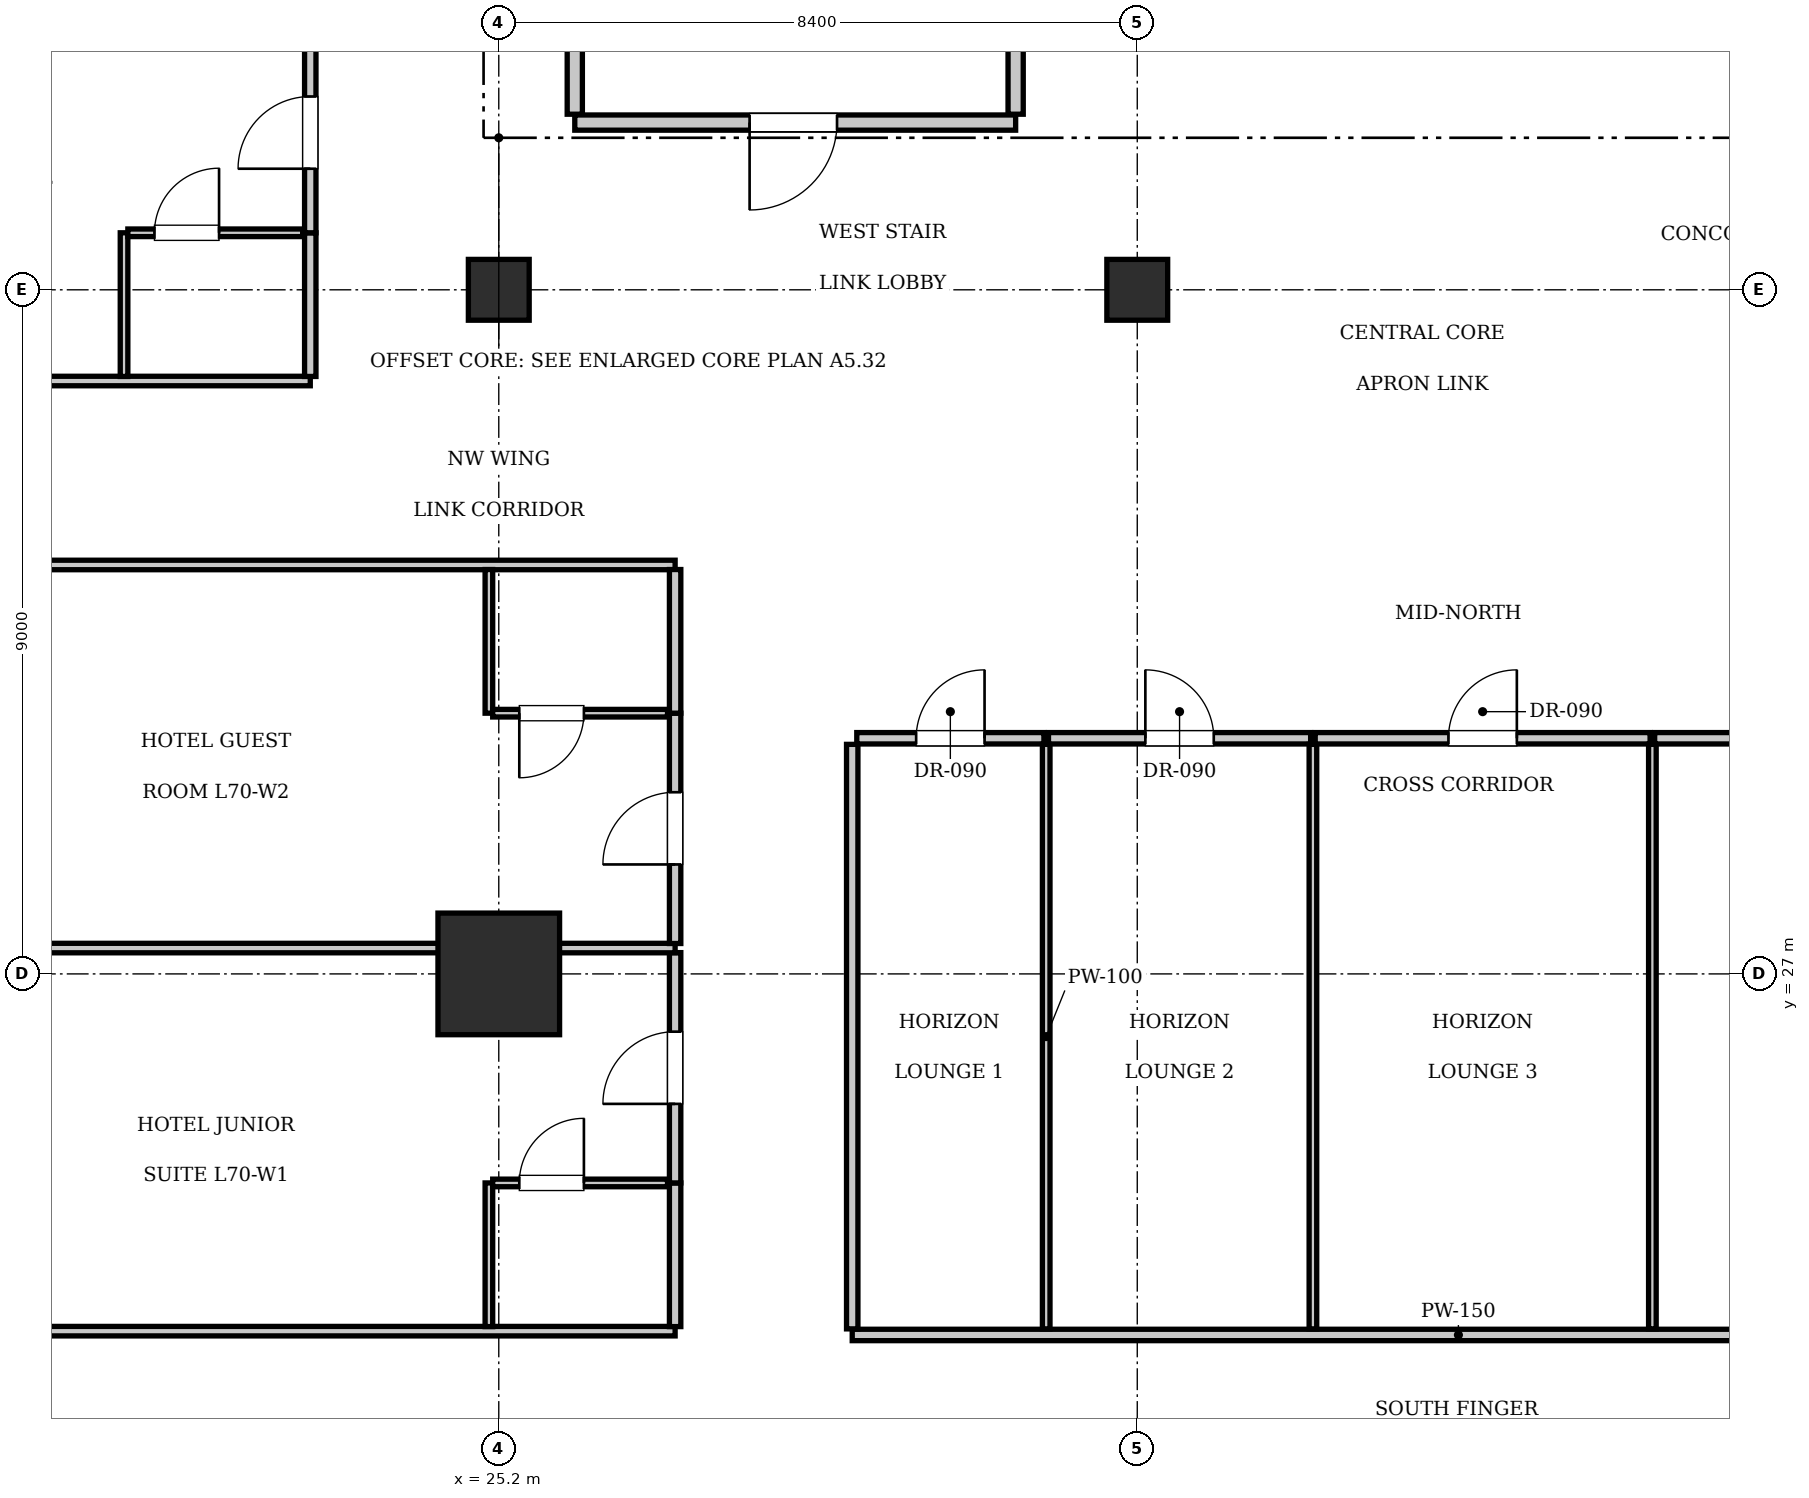
"""IFC4 building model, lengths in metres.
Left out: names, types, materials, properties, quantities, classifications, styles, units other than length and angle.
Written with IfcOpenShell. Run it as: python <this file> out.ifc"""

import sys

from ifc_helpers import new_model, si_unit, direction, frame, frame_2d, origin, origin_2d, place, context, subcontext, project, spatial, rectangle, extrude, element, fill, save


model = new_model("IFC4")
c1 = context("Model", 3, precision=1e-05, world=origin(), true_north=direction((0.0, 1.0)))
c2 = subcontext(c1, "Body", "Model", "MODEL_VIEW")
j1 = project(units=[si_unit("LENGTHUNIT", "METRE"), si_unit("PLANEANGLEUNIT", "RADIAN")], contexts=[c1])
p1 = place(None, origin())
s1 = spatial("IfcSite", under=j1, at=p1, CompositionType="ELEMENT")
p2 = place(p1, origin())
s2 = spatial("IfcBuilding", under=s1, at=p2, CompositionType="ELEMENT")
p3 = place(p2, frame((0.0, 0.0, 285.6)))
s3 = spatial("IfcBuildingStorey", under=s2, at=p3, CompositionType="ELEMENT", Elevation=285.6)
p4 = place(p3, frame((25.2, 27.0, 0.0), z_axis=(0.0, 0.0, 1.0), x_axis=(1.0, 0.0, 0.0)))
e1 = element("IfcColumn", 1, at=p4, inside=s3, PredefinedType="COLUMN", context=c2, shape_type="SweptSolid", body=[
    extrude(rectangle(XDim=1.6, YDim=1.6, at=origin_2d()), origin(), (0.0, 0.0, 1.0), 3.85),
])
for number, where, z_axis, x_axis in (
    (2, (25.2, 36.0, 0.0), (0.0, 0.0, 1.0), (1.0, 0.0, 0.0)),
    (3, (33.6, 36.0, 0.0), (0.0, 0.0, 1.0), (1.0, 0.0, 0.0)),
):
    element("IfcColumn", number, at=place(p3, frame(where, z_axis=z_axis, x_axis=x_axis)), inside=s3, PredefinedType="COLUMN", context=c2, shape_type="SweptSolid", body=[
        extrude(rectangle(XDim=0.8, YDim=0.8, at=origin_2d()), origin(), (0.0, 0.0, 1.0), 3.85),
    ])
p5 = place(p3, frame((26.2, 38.2, 0.0), z_axis=(0.0, 0.0, 1.0), x_axis=(1.0, 0.0, 0.0)))
e4 = element("IfcWall", 4, at=p5, inside=s3, PredefinedType="PARTITIONING", context=c2, shape_type="SweptSolid", body=[
    extrude(rectangle(XDim=5.8, YDim=0.2, at=frame_2d((2.9, 0.0))), origin(), (0.0, 0.0, 1.0), 3.61),
])
p6 = place(p5, frame((2.3, 0.0, 0.0)))
e5 = element("IfcOpeningElement", 5, at=p6, cuts=e4, PredefinedType="OPENING", context=c2, shape_type="SweptSolid", body=[
    extrude(rectangle(XDim=1.15, YDim=2.15, at=frame_2d((0.575, 1.075))), frame((0.0, 0.11, 0.0), z_axis=(0.0, -1.0, 0.0), x_axis=(1.0, 0.0, 0.0)), (0.0, 0.0, 1.0), 0.22),
])
for number, where, z_axis, x_axis in (
    (6, (26.2, 38.31, 0.0), (0.0, 0.0, 1.0), (0.0, 1.0, 0.0)),
    (7, (32.0, 38.31, 0.0), (0.0, 0.0, 1.0), (0.0, 1.0, 0.0)),
):
    element("IfcWall", number, at=place(p3, frame(where, z_axis=z_axis, x_axis=x_axis)), inside=s3, PredefinedType="PARTITIONING", context=c2, shape_type="SweptSolid", body=[
        extrude(rectangle(XDim=3.07, YDim=0.2, at=frame_2d((1.535, 0.0))), origin(), (0.0, 0.0, 1.0), 3.61),
    ])
p7 = place(p3, frame((29.85, 22.25, 0.0), z_axis=(0.0, 0.0, 1.0), x_axis=(1.0, 0.0, 0.0)))
e8 = element("IfcWall", 8, at=p7, inside=s3, PredefinedType="PARTITIONING", context=c2, shape_type="SweptSolid", body=[
    extrude(rectangle(XDim=15.95, YDim=0.15, at=frame_2d((7.975, 0.0))), origin(), (0.0, 0.0, 1.0), 3.61),
])
p8 = place(p3, frame((29.85, 22.33, 0.0), z_axis=(0.0, 0.0, 1.0), x_axis=(0.0, 1.0, 0.0)))
e9 = element("IfcWall", 9, at=p8, inside=s3, PredefinedType="PARTITIONING", context=c2, shape_type="SweptSolid", body=[
    extrude(rectangle(XDim=7.69, YDim=0.15, at=frame_2d((3.845, 0.0))), origin(), (0.0, 0.0, 1.0), 3.61),
])
p9 = place(p3, frame((29.91, 30.1, 0.0), z_axis=(0.0, 0.0, 1.0), x_axis=(1.0, 0.0, 0.0)))
e10 = element("IfcWall", 10, at=p9, inside=s3, PredefinedType="PARTITIONING", context=c2, shape_type="SweptSolid", body=[
    extrude(rectangle(XDim=2.462, YDim=0.15, at=frame_2d((1.231, 0.0))), origin(), (0.0, 0.0, 1.0), 3.61),
])
p10 = place(p9, frame((0.781, 0.0, 0.0)))
e11 = element("IfcOpeningElement", 11, at=p10, cuts=e10, PredefinedType="OPENING", context=c2, shape_type="SweptSolid", body=[
    extrude(rectangle(XDim=0.9, YDim=2.1, at=frame_2d((0.45, 1.05))), frame((0.0, 0.085, 0.0), z_axis=(0.0, -1.0, 0.0), x_axis=(1.0, 0.0, 0.0)), (0.0, 0.0, 1.0), 0.17),
])
p11 = place(p3, frame((32.402, 22.33, 0.0), z_axis=(0.0, 0.0, 1.0), x_axis=(0.0, 1.0, 0.0)))
e12 = element("IfcWall", 12, at=p11, inside=s3, PredefinedType="PARTITIONING", context=c2, shape_type="SweptSolid", body=[
    extrude(rectangle(XDim=7.69, YDim=0.1, at=frame_2d((3.845, 0.0))), origin(), (0.0, 0.0, 1.0), 3.61),
])
p12 = place(p3, frame((32.432, 30.1, 0.0), z_axis=(0.0, 0.0, 1.0), x_axis=(1.0, 0.0, 0.0)))
e13 = element("IfcWall", 13, at=p12, inside=s3, PredefinedType="PARTITIONING", context=c2, shape_type="SweptSolid", body=[
    extrude(rectangle(XDim=3.449, YDim=0.15, at=frame_2d((1.725, 0.0))), origin(), (0.0, 0.0, 1.0), 3.61),
])
p13 = place(p12, frame((1.274, 0.0, 0.0)))
e14 = element("IfcOpeningElement", 14, at=p13, cuts=e13, PredefinedType="OPENING", context=c2, shape_type="SweptSolid", body=[
    extrude(rectangle(XDim=0.9, YDim=2.1, at=frame_2d((0.45, 1.05))), frame((0.0, 0.085, 0.0), z_axis=(0.0, -1.0, 0.0), x_axis=(1.0, 0.0, 0.0)), (0.0, 0.0, 1.0), 0.17),
])
p14 = place(p3, frame((35.911, 22.33, 0.0), z_axis=(0.0, 0.0, 1.0), x_axis=(0.0, 1.0, 0.0)))
e15 = element("IfcWall", 15, at=p14, inside=s3, PredefinedType="PARTITIONING", context=c2, shape_type="SweptSolid", body=[
    extrude(rectangle(XDim=7.69, YDim=0.1, at=frame_2d((3.845, 0.0))), origin(), (0.0, 0.0, 1.0), 3.61),
])
p15 = place(p3, frame((35.941, 30.1, 0.0), z_axis=(0.0, 0.0, 1.0), x_axis=(1.0, 0.0, 0.0)))
e16 = element("IfcWall", 16, at=p15, inside=s3, PredefinedType="PARTITIONING", context=c2, shape_type="SweptSolid", body=[
    extrude(rectangle(XDim=4.406, YDim=0.15, at=frame_2d((2.203, 0.0))), origin(), (0.0, 0.0, 1.0), 3.61),
])
p16 = place(p15, frame((1.753, 0.0, 0.0)))
e17 = element("IfcOpeningElement", 17, at=p16, cuts=e16, PredefinedType="OPENING", context=c2, shape_type="SweptSolid", body=[
    extrude(rectangle(XDim=0.9, YDim=2.1, at=frame_2d((0.45, 1.05))), frame((0.0, 0.085, 0.0), z_axis=(0.0, -1.0, 0.0), x_axis=(1.0, 0.0, 0.0)), (0.0, 0.0, 1.0), 0.17),
])
p17 = place(p3, frame((40.377, 22.33, 0.0), z_axis=(0.0, 0.0, 1.0), x_axis=(0.0, 1.0, 0.0)))
e18 = element("IfcWall", 18, at=p17, inside=s3, PredefinedType="PARTITIONING", context=c2, shape_type="SweptSolid", body=[
    extrude(rectangle(XDim=7.69, YDim=0.1, at=frame_2d((3.845, 0.0))), origin(), (0.0, 0.0, 1.0), 3.61),
])
p18 = place(p3, frame((40.407, 30.1, 0.0), z_axis=(0.0, 0.0, 1.0), x_axis=(1.0, 0.0, 0.0)))
e19 = element("IfcWall", 19, at=p18, inside=s3, PredefinedType="PARTITIONING", context=c2, shape_type="SweptSolid", body=[
    extrude(rectangle(XDim=5.333, YDim=0.15, at=frame_2d((2.667, 0.0))), origin(), (0.0, 0.0, 1.0), 3.61),
])
p19 = place(p18, frame((2.217, 0.0, 0.0)))
e20 = element("IfcOpeningElement", 20, at=p19, cuts=e19, PredefinedType="OPENING", context=c2, shape_type="SweptSolid", body=[
    extrude(rectangle(XDim=0.9, YDim=2.1, at=frame_2d((0.45, 1.05))), frame((0.0, 0.085, 0.0), z_axis=(0.0, -1.0, 0.0), x_axis=(1.0, 0.0, 0.0)), (0.0, 0.0, 1.0), 0.17),
])
for number, where, z_axis, x_axis in (
    (21, (15.5, 22.3, 0.0), (0.0, 0.0, 1.0), (1.0, 0.0, 0.0)),
    (22, (15.5, 32.38, 0.0), (0.0, 0.0, 1.0), (1.0, 0.0, 0.0)),
):
    element("IfcWall", number, at=place(p3, frame(where, z_axis=z_axis, x_axis=x_axis)), inside=s3, PredefinedType="PARTITIONING", context=c2, shape_type="SweptSolid", body=[
        extrude(rectangle(XDim=12.02, YDim=0.125, at=frame_2d((6.01, 0.0))), origin(), (0.0, 0.0, 1.0), 3.61),
    ])
p20 = place(p3, frame((27.52, 22.36, 0.0), z_axis=(0.0, 0.0, 1.0), x_axis=(0.0, 1.0, 0.0)))
e23 = element("IfcWall", 23, at=p20, inside=s3, PredefinedType="PARTITIONING", context=c2, shape_type="SweptSolid", body=[
    extrude(rectangle(XDim=1.89, YDim=0.15, at=frame_2d((0.945, 0.0))), origin(), (0.0, 0.0, 1.0), 3.61),
])
p21 = place(p3, frame((27.52, 24.25, 0.0), z_axis=(0.0, 0.0, 1.0), x_axis=(0.0, 1.0, 0.0)))
e24 = element("IfcWall", 24, at=p21, inside=s3, PredefinedType="PARTITIONING", context=c2, shape_type="SweptSolid", body=[
    extrude(rectangle(XDim=3.03, YDim=0.15, at=frame_2d((1.515, 0.0))), origin(), (0.0, 0.0, 1.0), 3.61),
])
p22 = place(p21, frame((1.04, 0.0, 0.0)))
e25 = element("IfcOpeningElement", 25, at=p22, cuts=e24, PredefinedType="OPENING", context=c2, shape_type="SweptSolid", body=[
    extrude(rectangle(XDim=0.95, YDim=2.15, at=frame_2d((0.475, 1.075))), frame((0.0, 0.085, 0.0), z_axis=(0.0, -1.0, 0.0), x_axis=(1.0, 0.0, 0.0)), (0.0, 0.0, 1.0), 0.17),
])
p23 = place(p3, frame((25.07, 22.36, 0.0), z_axis=(0.0, 0.0, 1.0), x_axis=(0.0, 1.0, 0.0)))
e26 = element("IfcWall", 26, at=p23, inside=s3, PredefinedType="PARTITIONING", context=c2, shape_type="SweptSolid", body=[
    extrude(rectangle(XDim=1.89, YDim=0.1, at=frame_2d((0.945, 0.0))), origin(), (0.0, 0.0, 1.0), 3.61),
])
p24 = place(p3, frame((25.12, 24.25, 0.0), z_axis=(0.0, 0.0, 1.0), x_axis=(1.0, 0.0, 0.0)))
e27 = element("IfcWall", 27, at=p24, inside=s3, PredefinedType="PARTITIONING", context=c2, shape_type="SweptSolid", body=[
    extrude(rectangle(XDim=2.3, YDim=0.1, at=frame_2d((1.15, 0.0))), origin(), (0.0, 0.0, 1.0), 3.61),
])
p25 = place(p24, frame((0.35, 0.0, 0.0)))
e28 = element("IfcOpeningElement", 28, at=p25, cuts=e27, PredefinedType="OPENING", context=c2, shape_type="SweptSolid", body=[
    extrude(rectangle(XDim=0.85, YDim=2.1, at=frame_2d((0.425, 1.05))), frame((0.0, 0.06, 0.0), z_axis=(0.0, -1.0, 0.0), x_axis=(1.0, 0.0, 0.0)), (0.0, 0.0, 1.0), 0.12),
])
p26 = place(p3, frame((15.5, 27.34, 0.0), z_axis=(0.0, 0.0, 1.0), x_axis=(1.0, 0.0, 0.0)))
e29 = element("IfcWall", 29, at=p26, inside=s3, PredefinedType="PARTITIONING", context=c2, shape_type="SweptSolid", body=[
    extrude(rectangle(XDim=12.02, YDim=0.125, at=frame_2d((6.01, 0.0))), origin(), (0.0, 0.0, 1.0), 3.61),
])
p27 = place(p3, frame((27.52, 27.4, 0.0), z_axis=(0.0, 0.0, 1.0), x_axis=(0.0, 1.0, 0.0)))
e30 = element("IfcWall", 30, at=p27, inside=s3, PredefinedType="PARTITIONING", context=c2, shape_type="SweptSolid", body=[
    extrude(rectangle(XDim=3.03, YDim=0.15, at=frame_2d((1.515, 0.0))), origin(), (0.0, 0.0, 1.0), 3.61),
])
p28 = place(p27, frame((1.04, 0.0, 0.0)))
e31 = element("IfcOpeningElement", 31, at=p28, cuts=e30, PredefinedType="OPENING", context=c2, shape_type="SweptSolid", body=[
    extrude(rectangle(XDim=0.95, YDim=2.15, at=frame_2d((0.475, 1.075))), frame((0.0, 0.085, 0.0), z_axis=(0.0, -1.0, 0.0), x_axis=(1.0, 0.0, 0.0)), (0.0, 0.0, 1.0), 0.17),
])
p29 = place(p3, frame((27.52, 30.43, 0.0), z_axis=(0.0, 0.0, 1.0), x_axis=(0.0, 1.0, 0.0)))
e32 = element("IfcWall", 32, at=p29, inside=s3, PredefinedType="PARTITIONING", context=c2, shape_type="SweptSolid", body=[
    extrude(rectangle(XDim=1.89, YDim=0.15, at=frame_2d((0.945, 0.0))), origin(), (0.0, 0.0, 1.0), 3.61),
])
p30 = place(p3, frame((25.07, 30.43, 0.0), z_axis=(0.0, 0.0, 1.0), x_axis=(0.0, 1.0, 0.0)))
e33 = element("IfcWall", 33, at=p30, inside=s3, PredefinedType="PARTITIONING", context=c2, shape_type="SweptSolid", body=[
    extrude(rectangle(XDim=1.89, YDim=0.1, at=frame_2d((0.945, 0.0))), origin(), (0.0, 0.0, 1.0), 3.61),
])
p31 = place(p3, frame((25.12, 30.43, 0.0), z_axis=(0.0, 0.0, 1.0), x_axis=(1.0, 0.0, 0.0)))
e34 = element("IfcWall", 34, at=p31, inside=s3, PredefinedType="PARTITIONING", context=c2, shape_type="SweptSolid", body=[
    extrude(rectangle(XDim=2.3, YDim=0.1, at=frame_2d((1.15, 0.0))), origin(), (0.0, 0.0, 1.0), 3.61),
])
p32 = place(p31, frame((0.35, 0.0, 0.0)))
e35 = element("IfcOpeningElement", 35, at=p32, cuts=e34, PredefinedType="OPENING", context=c2, shape_type="SweptSolid", body=[
    extrude(rectangle(XDim=0.85, YDim=2.1, at=frame_2d((0.425, 1.05))), frame((0.0, 0.06, 0.0), z_axis=(0.0, -1.0, 0.0), x_axis=(1.0, 0.0, 0.0)), (0.0, 0.0, 1.0), 0.12),
])
p33 = place(p3, frame((15.5, 34.8, 0.0), z_axis=(0.0, 0.0, 1.0), x_axis=(1.0, 0.0, 0.0)))
e36 = element("IfcWall", 36, at=p33, inside=s3, PredefinedType="PARTITIONING", context=c2, shape_type="SweptSolid", body=[
    extrude(rectangle(XDim=7.22, YDim=0.125, at=frame_2d((3.61, 0.0))), origin(), (0.0, 0.0, 1.0), 3.61),
])
p34 = place(p3, frame((22.72, 34.86, 0.0), z_axis=(0.0, 0.0, 1.0), x_axis=(0.0, 1.0, 0.0)))
e37 = element("IfcWall", 37, at=p34, inside=s3, PredefinedType="PARTITIONING", context=c2, shape_type="SweptSolid", body=[
    extrude(rectangle(XDim=1.89, YDim=0.15, at=frame_2d((0.945, 0.0))), origin(), (0.0, 0.0, 1.0), 3.61),
])
p35 = place(p3, frame((22.72, 36.75, 0.0), z_axis=(0.0, 0.0, 1.0), x_axis=(0.0, 1.0, 0.0)))
e38 = element("IfcWall", 38, at=p35, inside=s3, PredefinedType="PARTITIONING", context=c2, shape_type="SweptSolid", body=[
    extrude(rectangle(XDim=2.636, YDim=0.15, at=frame_2d((1.318, 0.0))), origin(), (0.0, 0.0, 1.0), 3.61),
])
p36 = place(p35, frame((0.843, 0.0, 0.0)))
e39 = element("IfcOpeningElement", 39, at=p36, cuts=e38, PredefinedType="OPENING", context=c2, shape_type="SweptSolid", body=[
    extrude(rectangle(XDim=0.95, YDim=2.15, at=frame_2d((0.475, 1.075))), frame((0.0, 0.085, 0.0), z_axis=(0.0, -1.0, 0.0), x_axis=(1.0, 0.0, 0.0)), (0.0, 0.0, 1.0), 0.17),
])
p37 = place(p3, frame((20.27, 34.86, 0.0), z_axis=(0.0, 0.0, 1.0), x_axis=(0.0, 1.0, 0.0)))
e40 = element("IfcWall", 40, at=p37, inside=s3, PredefinedType="PARTITIONING", context=c2, shape_type="SweptSolid", body=[
    extrude(rectangle(XDim=1.89, YDim=0.1, at=frame_2d((0.945, 0.0))), origin(), (0.0, 0.0, 1.0), 3.61),
])
p38 = place(p3, frame((20.32, 36.75, 0.0), z_axis=(0.0, 0.0, 1.0), x_axis=(1.0, 0.0, 0.0)))
e41 = element("IfcWall", 41, at=p38, inside=s3, PredefinedType="PARTITIONING", context=c2, shape_type="SweptSolid", body=[
    extrude(rectangle(XDim=2.3, YDim=0.1, at=frame_2d((1.15, 0.0))), origin(), (0.0, 0.0, 1.0), 3.61),
])
p39 = place(p38, frame((0.35, 0.0, 0.0)))
e42 = element("IfcOpeningElement", 42, at=p39, cuts=e41, PredefinedType="OPENING", context=c2, shape_type="SweptSolid", body=[
    extrude(rectangle(XDim=0.85, YDim=2.1, at=frame_2d((0.425, 1.05))), frame((0.0, 0.06, 0.0), z_axis=(0.0, -1.0, 0.0), x_axis=(1.0, 0.0, 0.0)), (0.0, 0.0, 1.0), 0.12),
])
p40 = place(p6, frame((1.15, 0.0, 0.0), z_axis=(0.0, 0.0, 1.0), x_axis=(-1.0, 0.0, 0.0)))
e43 = element("IfcDoor", 43, at=p40, inside=s3, OperationType="SINGLE_SWING_RIGHT", PredefinedType="DOOR", context=c2, shape_type="SweptSolid", body=[
    extrude(rectangle(XDim=1.15, YDim=2.15, at=frame_2d((0.575, 1.075))), frame((0.0, 0.025, 0.0), z_axis=(0.0, -1.0, 0.0), x_axis=(1.0, 0.0, 0.0)), (0.0, 0.0, 1.0), 0.05),
])
fill(e5, e43)
p41 = place(p10, origin())
e44 = element("IfcDoor", 44, at=p41, inside=s3, OperationType="SINGLE_SWING_RIGHT", PredefinedType="DOOR", context=c2, shape_type="SweptSolid", body=[
    extrude(rectangle(XDim=0.9, YDim=2.1, at=frame_2d((0.45, 1.05))), frame((0.0, 0.025, 0.0), z_axis=(0.0, -1.0, 0.0), x_axis=(1.0, 0.0, 0.0)), (0.0, 0.0, 1.0), 0.05),
])
fill(e11, e44)
p42 = place(p13, origin())
e45 = element("IfcDoor", 45, at=p42, inside=s3, OperationType="SINGLE_SWING_LEFT", PredefinedType="DOOR", context=c2, shape_type="SweptSolid", body=[
    extrude(rectangle(XDim=0.9, YDim=2.1, at=frame_2d((0.45, 1.05))), frame((0.0, 0.025, 0.0), z_axis=(0.0, -1.0, 0.0), x_axis=(1.0, 0.0, 0.0)), (0.0, 0.0, 1.0), 0.05),
])
fill(e14, e45)
p43 = place(p16, origin())
e46 = element("IfcDoor", 46, at=p43, inside=s3, OperationType="SINGLE_SWING_RIGHT", PredefinedType="DOOR", context=c2, shape_type="SweptSolid", body=[
    extrude(rectangle(XDim=0.9, YDim=2.1, at=frame_2d((0.45, 1.05))), frame((0.0, 0.025, 0.0), z_axis=(0.0, -1.0, 0.0), x_axis=(1.0, 0.0, 0.0)), (0.0, 0.0, 1.0), 0.05),
])
fill(e17, e46)
p44 = place(p25, origin())
e47 = element("IfcDoor", 47, at=p44, inside=s3, OperationType="SINGLE_SWING_RIGHT", PredefinedType="DOOR", context=c2, shape_type="SweptSolid", body=[
    extrude(rectangle(XDim=0.85, YDim=2.1, at=frame_2d((0.425, 1.05))), frame((0.0, 0.025, 0.0), z_axis=(0.0, -1.0, 0.0), x_axis=(1.0, 0.0, 0.0)), (0.0, 0.0, 1.0), 0.05),
])
fill(e28, e47)
p45 = place(p22, origin())
e48 = element("IfcDoor", 48, at=p45, inside=s3, OperationType="SINGLE_SWING_LEFT", PredefinedType="DOOR", context=c2, shape_type="SweptSolid", body=[
    extrude(rectangle(XDim=0.95, YDim=2.15, at=frame_2d((0.475, 1.075))), frame((0.0, 0.025, 0.0), z_axis=(0.0, -1.0, 0.0), x_axis=(1.0, 0.0, 0.0)), (0.0, 0.0, 1.0), 0.05),
])
fill(e25, e48)
p46 = place(p32, frame((0.85, 0.0, 0.0), z_axis=(0.0, 0.0, 1.0), x_axis=(-1.0, 0.0, 0.0)))
e49 = element("IfcDoor", 49, at=p46, inside=s3, OperationType="SINGLE_SWING_RIGHT", PredefinedType="DOOR", context=c2, shape_type="SweptSolid", body=[
    extrude(rectangle(XDim=0.85, YDim=2.1, at=frame_2d((0.425, 1.05))), frame((0.0, 0.025, 0.0), z_axis=(0.0, -1.0, 0.0), x_axis=(1.0, 0.0, 0.0)), (0.0, 0.0, 1.0), 0.05),
])
fill(e35, e49)
p47 = place(p28, origin())
e50 = element("IfcDoor", 50, at=p47, inside=s3, OperationType="SINGLE_SWING_LEFT", PredefinedType="DOOR", context=c2, shape_type="SweptSolid", body=[
    extrude(rectangle(XDim=0.95, YDim=2.15, at=frame_2d((0.475, 1.075))), frame((0.0, 0.025, 0.0), z_axis=(0.0, -1.0, 0.0), x_axis=(1.0, 0.0, 0.0)), (0.0, 0.0, 1.0), 0.05),
])
fill(e31, e50)
p48 = place(p39, origin())
e51 = element("IfcDoor", 51, at=p48, inside=s3, OperationType="SINGLE_SWING_RIGHT", PredefinedType="DOOR", context=c2, shape_type="SweptSolid", body=[
    extrude(rectangle(XDim=0.85, YDim=2.1, at=frame_2d((0.425, 1.05))), frame((0.0, 0.025, 0.0), z_axis=(0.0, -1.0, 0.0), x_axis=(1.0, 0.0, 0.0)), (0.0, 0.0, 1.0), 0.05),
])
fill(e42, e51)
p49 = place(p36, origin())
e52 = element("IfcDoor", 52, at=p49, inside=s3, OperationType="SINGLE_SWING_LEFT", PredefinedType="DOOR", context=c2, shape_type="SweptSolid", body=[
    extrude(rectangle(XDim=0.95, YDim=2.15, at=frame_2d((0.475, 1.075))), frame((0.0, 0.025, 0.0), z_axis=(0.0, -1.0, 0.0), x_axis=(1.0, 0.0, 0.0)), (0.0, 0.0, 1.0), 0.05),
])
fill(e39, e52)
save(model, sys.argv[1])
